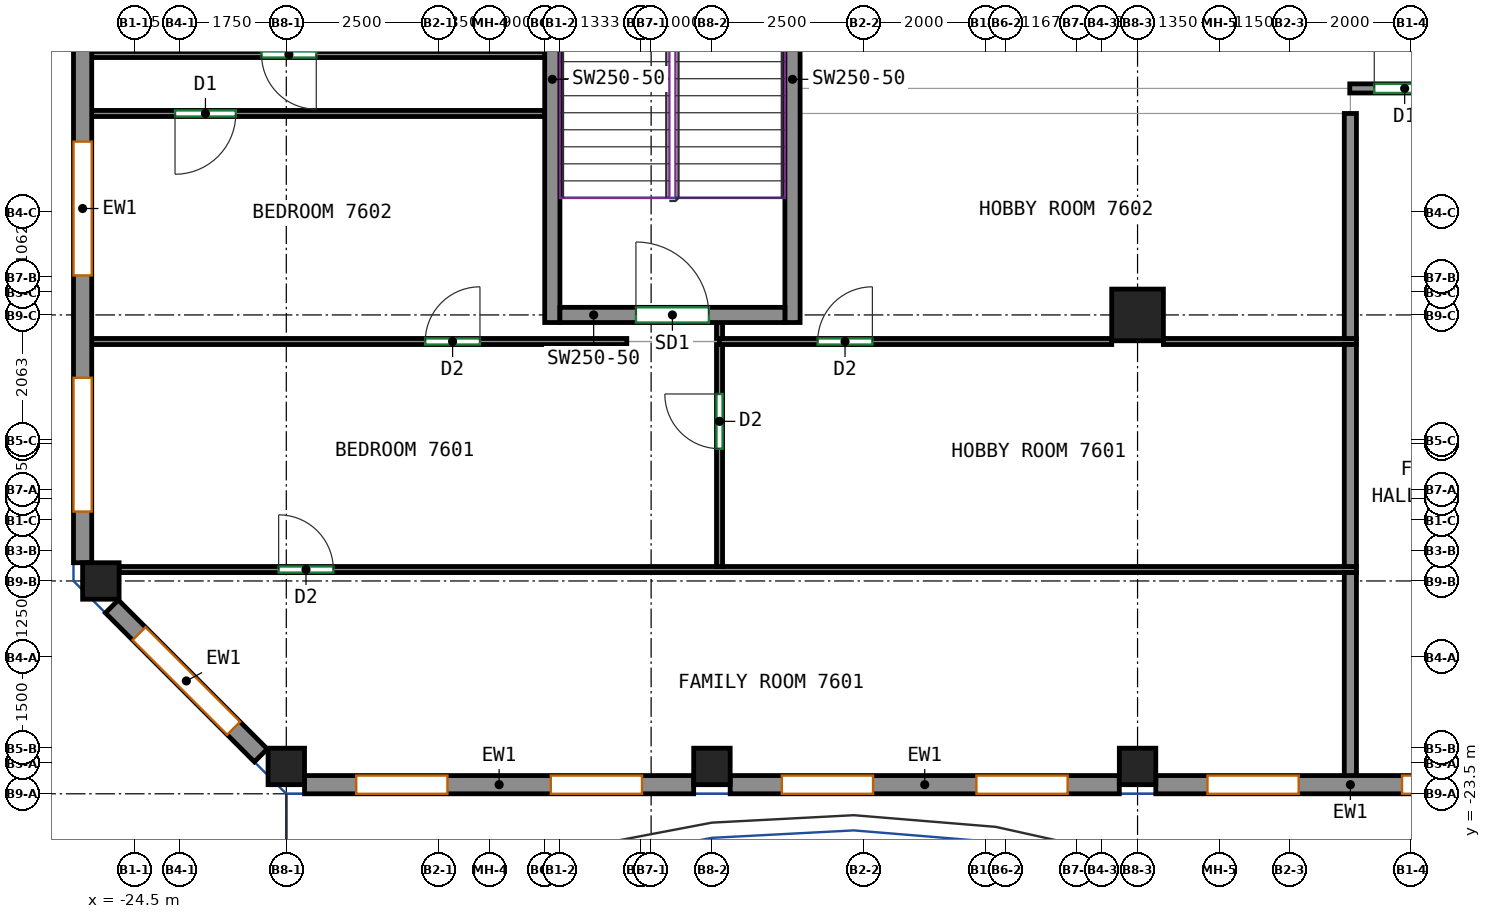
"""IFC4 building model, lengths in metres.
Left out: names, types, materials, properties, quantities, classifications, styles, units other than length and angle.
Written with IfcOpenShell. Run it as: python <this file> out.ifc"""

import sys

from ifc_helpers import new_model, si_unit, direction, frame, frame_2d, origin, origin_2d, place, context, subcontext, project, spatial, rectangle, extrude, source, transform, mapped, element, fill, save


model = new_model("IFC4")
c1 = context("Model", 3, precision=1e-05, world=origin(), true_north=direction((0.0, 1.0)))
c2 = subcontext(c1, "Body", "Model", "MODEL_VIEW")
j1 = project(units=[si_unit("LENGTHUNIT", "METRE"), si_unit("PLANEANGLEUNIT", "RADIAN")], contexts=[c1])
p1 = place(None, origin())
s1 = spatial("IfcSite", under=j1, at=p1, CompositionType="ELEMENT")
p2 = place(p1, origin())
s2 = spatial("IfcBuilding", under=s1, at=p2, CompositionType="ELEMENT")
p3 = place(p2, frame((0.0, 0.0, 305.2)))
s3 = spatial("IfcBuildingStorey", under=s2, at=p3, CompositionType="ELEMENT", Elevation=305.2)
m1 = source(origin(), c2, "Body", "SweptSolid", [
    extrude(rectangle(XDim=0.6, YDim=0.6, at=origin_2d()), origin(), (0.0, 0.0, 1.0), 3.12),
])
for number, where, z_axis, x_axis in (
    (1, (-25.05, -20.0, 0.0), (0.0, 0.0, 1.0), (1.0, 0.0, 0.0)),
    (2, (-22.0, -23.05, 0.0), (0.0, 0.0, 1.0), (1.0, 0.0, 0.0)),
    (3, (-15.0, -23.05, 0.0), (0.0, 0.0, 1.0), (1.0, 0.0, 0.0)),
    (4, (-8.0, -23.05, 0.0), (0.0, 0.0, 1.0), (1.0, 0.0, 0.0)),
):
    element("IfcColumn", number, at=place(p3, frame(where, z_axis=z_axis, x_axis=x_axis)), inside=s3, PredefinedType="COLUMN", context=c2, shape_type="MappedRepresentation", body=[
        mapped(m1, transform((0.0, 0.0, 0.0))),
    ])
m2 = source(origin(), c2, "Body", "SweptSolid", [
    extrude(rectangle(XDim=0.85, YDim=0.85, at=origin_2d()), origin(), (0.0, 0.0, 1.0), 3.12),
])
p4 = place(p3, frame((-8.0, -15.625, 0.0), z_axis=(0.0, 0.0, 1.0), x_axis=(1.0, 0.0, 0.0)))
e5 = element("IfcColumn", 5, at=p4, inside=s3, PredefinedType="COLUMN", context=c2, shape_type="MappedRepresentation", body=[
    mapped(m2, transform((0.0, 0.0, 0.0))),
])
m3 = source(origin(), c2, "Body", "SweptSolid", [
    extrude(rectangle(XDim=8.0, YDim=0.25, at=frame_2d((4.0, 0.0))), origin(), (0.0, 0.0, 1.0), 3.12),
])
for number, where, z_axis, x_axis in (
    (6, (-17.625, -15.75, 0.0), (0.0, 0.0, 1.0), (0.0, 1.0, 0.0)),
    (7, (-13.675, -15.75, 0.0), (0.0, 0.0, 1.0), (0.0, 1.0, 0.0)),
):
    element("IfcWall", number, at=place(p3, frame(where, z_axis=z_axis, x_axis=x_axis)), inside=s3, PredefinedType="SHEAR", context=c2, shape_type="MappedRepresentation", body=[
        mapped(m3, transform((0.0, 0.0, 0.0))),
    ])
m4 = source(origin(), c2, "Body", "SweptSolid", [
    extrude(rectangle(XDim=3.7, YDim=0.25, at=frame_2d((1.85, 0.0))), origin(), (0.0, 0.0, 1.0), 3.12),
])
p5 = place(p3, frame((-17.5, -15.625, 0.0), z_axis=(0.0, 0.0, 1.0), x_axis=(1.0, 0.0, 0.0)))
e8 = element("IfcWall", 8, at=p5, inside=s3, PredefinedType="SHEAR", context=c2, shape_type="MappedRepresentation", body=[
    mapped(m4, transform((0.0, 0.0, 0.0))),
])
p6 = place(p5, frame((1.25, 0.0, 0.0)))
e9 = element("IfcOpeningElement", 9, at=p6, cuts=e8, PredefinedType="OPENING", context=c2, shape_type="SweptSolid", body=[
    extrude(rectangle(XDim=1.2, YDim=2.1, at=frame_2d((0.6, 1.05))), frame((0.0, 0.135, 0.0), z_axis=(0.0, -1.0, 0.0), x_axis=(1.0, 0.0, 0.0)), (0.0, 0.0, 1.0), 0.27),
])
m5 = source(origin(), c2, "Body", "SweptSolid", [
    extrude(rectangle(XDim=6.4, YDim=0.3, at=frame_2d((3.2, 0.0))), origin(), (0.0, 0.0, 1.0), 3.12),
])
p7 = place(p3, frame((-21.7, -23.35, 0.0), z_axis=(0.0, 0.0, 1.0), x_axis=(1.0, 0.0, 0.0)))
e10 = element("IfcWall", 10, at=p7, inside=s3, PredefinedType="SOLIDWALL", context=c2, shape_type="MappedRepresentation", body=[
    mapped(m5, transform((0.0, 0.0, 0.0))),
])
p8 = place(p7, frame((0.85, 0.0, 0.8)))
e11 = element("IfcOpeningElement", 11, at=p8, cuts=e10, PredefinedType="OPENING", context=c2, shape_type="SweptSolid", body=[
    extrude(rectangle(XDim=1.5, YDim=2.05, at=frame_2d((0.75, 1.025))), frame((0.0, 0.16, 0.0), z_axis=(0.0, -1.0, 0.0), x_axis=(1.0, 0.0, 0.0)), (0.0, 0.0, 1.0), 0.32),
])
p9 = place(p7, frame((4.05, 0.0, 0.8)))
e12 = element("IfcOpeningElement", 12, at=p9, cuts=e10, PredefinedType="OPENING", context=c2, shape_type="SweptSolid", body=[
    extrude(rectangle(XDim=1.5, YDim=2.05, at=frame_2d((0.75, 1.025))), frame((0.0, 0.16, 0.0), z_axis=(0.0, -1.0, 0.0), x_axis=(1.0, 0.0, 0.0)), (0.0, 0.0, 1.0), 0.32),
])
p10 = place(p3, frame((-14.7, -23.35, 0.0), z_axis=(0.0, 0.0, 1.0), x_axis=(1.0, 0.0, 0.0)))
e13 = element("IfcWall", 13, at=p10, inside=s3, PredefinedType="SOLIDWALL", context=c2, shape_type="MappedRepresentation", body=[
    mapped(m5, transform((0.0, 0.0, 0.0))),
])
p11 = place(p10, frame((0.85, 0.0, 0.8)))
e14 = element("IfcOpeningElement", 14, at=p11, cuts=e13, PredefinedType="OPENING", context=c2, shape_type="SweptSolid", body=[
    extrude(rectangle(XDim=1.5, YDim=2.05, at=frame_2d((0.75, 1.025))), frame((0.0, 0.16, 0.0), z_axis=(0.0, -1.0, 0.0), x_axis=(1.0, 0.0, 0.0)), (0.0, 0.0, 1.0), 0.32),
])
p12 = place(p10, frame((4.05, 0.0, 0.8)))
e15 = element("IfcOpeningElement", 15, at=p12, cuts=e13, PredefinedType="OPENING", context=c2, shape_type="SweptSolid", body=[
    extrude(rectangle(XDim=1.5, YDim=2.05, at=frame_2d((0.75, 1.025))), frame((0.0, 0.16, 0.0), z_axis=(0.0, -1.0, 0.0), x_axis=(1.0, 0.0, 0.0)), (0.0, 0.0, 1.0), 0.32),
])
p13 = place(p3, frame((-7.7, -23.35, 0.0), z_axis=(0.0, 0.0, 1.0), x_axis=(1.0, 0.0, 0.0)))
e16 = element("IfcWall", 16, at=p13, inside=s3, PredefinedType="SOLIDWALL", context=c2, shape_type="MappedRepresentation", body=[
    mapped(m5, transform((0.0, 0.0, 0.0))),
])
p14 = place(p13, frame((0.85, 0.0, 0.8)))
e17 = element("IfcOpeningElement", 17, at=p14, cuts=e16, PredefinedType="OPENING", context=c2, shape_type="SweptSolid", body=[
    extrude(rectangle(XDim=1.5, YDim=2.05, at=frame_2d((0.75, 1.025))), frame((0.0, 0.16, 0.0), z_axis=(0.0, -1.0, 0.0), x_axis=(1.0, 0.0, 0.0)), (0.0, 0.0, 1.0), 0.32),
])
p15 = place(p13, frame((4.05, 0.0, 0.8)))
e18 = element("IfcOpeningElement", 18, at=p15, cuts=e16, PredefinedType="OPENING", context=c2, shape_type="SweptSolid", body=[
    extrude(rectangle(XDim=1.5, YDim=2.05, at=frame_2d((0.75, 1.025))), frame((0.0, 0.16, 0.0), z_axis=(0.0, -1.0, 0.0), x_axis=(1.0, 0.0, 0.0)), (0.0, 0.0, 1.0), 0.32),
])
m6 = source(origin(), c2, "Body", "SweptSolid", [
    extrude(rectangle(XDim=11.65, YDim=0.3, at=frame_2d((5.825, 0.0))), origin(), (0.0, 0.0, 1.0), 3.12),
])
p16 = place(p3, frame((-25.35, -8.05, 0.0), z_axis=(0.0, 0.0, 1.0), x_axis=(0.0, -1.0, 0.0)))
e19 = element("IfcWall", 19, at=p16, inside=s3, PredefinedType="SOLIDWALL", context=c2, shape_type="MappedRepresentation", body=[
    mapped(m6, transform((0.0, 0.0, 0.0))),
])
p17 = place(p16, frame((0.842, 0.0, 0.8)))
e20 = element("IfcOpeningElement", 20, at=p17, cuts=e19, PredefinedType="OPENING", context=c2, shape_type="SweptSolid", body=[
    extrude(rectangle(XDim=2.2, YDim=2.05, at=frame_2d((1.1, 1.025))), frame((0.0, 0.16, 0.0), z_axis=(0.0, -1.0, 0.0), x_axis=(1.0, 0.0, 0.0)), (0.0, 0.0, 1.0), 0.32),
])
p18 = place(p16, frame((4.725, 0.0, 0.8)))
e21 = element("IfcOpeningElement", 21, at=p18, cuts=e19, PredefinedType="OPENING", context=c2, shape_type="SweptSolid", body=[
    extrude(rectangle(XDim=2.2, YDim=2.05, at=frame_2d((1.1, 1.025))), frame((0.0, 0.16, 0.0), z_axis=(0.0, -1.0, 0.0), x_axis=(1.0, 0.0, 0.0)), (0.0, 0.0, 1.0), 0.32),
])
p19 = place(p16, frame((8.608, 0.0, 0.8)))
e22 = element("IfcOpeningElement", 22, at=p19, cuts=e19, PredefinedType="OPENING", context=c2, shape_type="SweptSolid", body=[
    extrude(rectangle(XDim=2.2, YDim=2.05, at=frame_2d((1.1, 1.025))), frame((0.0, 0.16, 0.0), z_axis=(0.0, -1.0, 0.0), x_axis=(1.0, 0.0, 0.0)), (0.0, 0.0, 1.0), 0.32),
])
m7 = source(origin(), c2, "Body", "SweptSolid", [
    extrude(rectangle(XDim=3.465, YDim=0.3, at=frame_2d((1.732, 0.0))), origin(), (0.0, 0.0, 1.0), 3.12),
])
p20 = place(p3, frame((-24.869, -20.419, 0.0), z_axis=(0.0, 0.0, 1.0), x_axis=(0.707106781187, -0.707106781187, 0.0)))
e23 = element("IfcWall", 23, at=p20, inside=s3, PredefinedType="SOLIDWALL", context=c2, shape_type="MappedRepresentation", body=[
    mapped(m7, transform((0.0, 0.0, 0.0))),
])
p21 = place(p20, frame((0.632, 0.0, 0.8)))
e24 = element("IfcOpeningElement", 24, at=p21, cuts=e23, PredefinedType="OPENING", context=c2, shape_type="SweptSolid", body=[
    extrude(rectangle(XDim=2.2, YDim=2.05, at=frame_2d((1.1, 1.025))), frame((0.0, 0.16, 0.0), z_axis=(0.0, -1.0, 0.0), x_axis=(1.0, 0.0, 0.0)), (0.0, 0.0, 1.0), 0.32),
])
p22 = place(p3, frame((-4.51, -11.9, 0.0), z_axis=(0.0, 0.0, 1.0), x_axis=(1.0, 0.0, 0.0)))
e25 = element("IfcWall", 25, at=p22, inside=s3, PredefinedType="PARTITIONING", context=c2, shape_type="SweptSolid", body=[
    extrude(rectangle(XDim=22.26, YDim=0.15, at=frame_2d((11.13, 0.0))), origin(), (0.0, 0.0, 1.0), 3.12),
])
p23 = place(p22, frame((0.403, 0.0, 0.0)))
e26 = element("IfcOpeningElement", 26, at=p23, cuts=e25, PredefinedType="OPENING", context=c2, shape_type="SweptSolid", body=[
    extrude(rectangle(XDim=1.0, YDim=2.1, at=frame_2d((0.5, 1.05))), frame((0.0, 0.085, 0.0), z_axis=(0.0, -1.0, 0.0), x_axis=(1.0, 0.0, 0.0)), (0.0, 0.0, 1.0), 0.17),
])
p24 = place(p3, frame((-24.75, -19.812, 0.0), z_axis=(0.0, 0.0, 1.0), x_axis=(1.0, 0.0, 0.0)))
e27 = element("IfcWall", 27, at=p24, inside=s3, PredefinedType="PARTITIONING", context=c2, shape_type="SweptSolid", body=[
    extrude(rectangle(XDim=20.35, YDim=0.1, at=frame_2d((10.175, 0.0))), origin(), (0.0, 0.0, 1.0), 3.12),
])
p25 = place(p24, frame((2.624, 0.0, 0.0)))
e28 = element("IfcOpeningElement", 28, at=p25, cuts=e27, PredefinedType="OPENING", context=c2, shape_type="SweptSolid", body=[
    extrude(rectangle(XDim=0.9, YDim=2.1, at=frame_2d((0.45, 1.05))), frame((0.0, 0.06, 0.0), z_axis=(0.0, -1.0, 0.0), x_axis=(1.0, 0.0, 0.0)), (0.0, 0.0, 1.0), 0.12),
])
p26 = place(p3, frame((-4.5, -23.25, 0.0), z_axis=(0.0, 0.0, 1.0), x_axis=(0.0, 1.0, 0.0)))
e29 = element("IfcWall", 29, at=p26, inside=s3, PredefinedType="PARTITIONING", context=c2, shape_type="SweptSolid", body=[
    extrude(rectangle(XDim=3.388, YDim=0.2, at=frame_2d((1.694, 0.0))), origin(), (0.0, 0.0, 1.0), 3.12),
])
p27 = place(p3, frame((-14.875, -19.762, 0.0), z_axis=(0.0, 0.0, 1.0), x_axis=(0.0, 1.0, 0.0)))
e30 = element("IfcWall", 30, at=p27, inside=s3, PredefinedType="PARTITIONING", context=c2, shape_type="SweptSolid", body=[
    extrude(rectangle(XDim=3.65, YDim=0.1, at=frame_2d((1.825, 0.0))), origin(), (0.0, 0.0, 1.0), 3.12),
])
p28 = place(p27, frame((1.937, 0.0, 0.0)))
e31 = element("IfcOpeningElement", 31, at=p28, cuts=e30, PredefinedType="OPENING", context=c2, shape_type="SweptSolid", body=[
    extrude(rectangle(XDim=0.9, YDim=2.1, at=frame_2d((0.45, 1.05))), frame((0.0, 0.06, 0.0), z_axis=(0.0, -1.0, 0.0), x_axis=(1.0, 0.0, 0.0)), (0.0, 0.0, 1.0), 0.12),
])
p29 = place(p3, frame((-25.25, -16.062, 0.0), z_axis=(0.0, 0.0, 1.0), x_axis=(1.0, 0.0, 0.0)))
e32 = element("IfcWall", 32, at=p29, inside=s3, PredefinedType="PARTITIONING", context=c2, shape_type="SweptSolid", body=[
    extrude(rectangle(XDim=8.85, YDim=0.1, at=frame_2d((4.425, 0.0))), origin(), (0.0, 0.0, 1.0), 3.12),
])
p30 = place(p29, frame((5.535, 0.0, 0.0)))
e33 = element("IfcOpeningElement", 33, at=p30, cuts=e32, PredefinedType="OPENING", context=c2, shape_type="SweptSolid", body=[
    extrude(rectangle(XDim=0.9, YDim=2.1, at=frame_2d((0.45, 1.05))), frame((0.0, 0.06, 0.0), z_axis=(0.0, -1.0, 0.0), x_axis=(1.0, 0.0, 0.0)), (0.0, 0.0, 1.0), 0.12),
])
p31 = place(p3, frame((-7.575, -16.062, 0.0), z_axis=(0.0, 0.0, 1.0), x_axis=(1.0, 0.0, 0.0)))
e34 = element("IfcWall", 34, at=p31, inside=s3, PredefinedType="PARTITIONING", context=c2, shape_type="SweptSolid", body=[
    extrude(rectangle(XDim=3.175, YDim=0.1, at=frame_2d((1.587, 0.0))), origin(), (0.0, 0.0, 1.0), 3.12),
])
p32 = place(p3, frame((-14.875, -16.062, 0.0), z_axis=(0.0, 0.0, 1.0), x_axis=(1.0, 0.0, 0.0)))
e35 = element("IfcWall", 35, at=p32, inside=s3, PredefinedType="PARTITIONING", context=c2, shape_type="SweptSolid", body=[
    extrude(rectangle(XDim=6.45, YDim=0.1, at=frame_2d((3.225, 0.0))), origin(), (0.0, 0.0, 1.0), 3.12),
])
p33 = place(p32, frame((1.614, 0.0, 0.0)))
e36 = element("IfcOpeningElement", 36, at=p33, cuts=e35, PredefinedType="OPENING", context=c2, shape_type="SweptSolid", body=[
    extrude(rectangle(XDim=0.9, YDim=2.1, at=frame_2d((0.45, 1.05))), frame((0.0, 0.06, 0.0), z_axis=(0.0, -1.0, 0.0), x_axis=(1.0, 0.0, 0.0)), (0.0, 0.0, 1.0), 0.12),
])
p34 = place(p3, frame((-4.5, -19.762, 0.0), z_axis=(0.0, 0.0, 1.0), x_axis=(0.0, 1.0, 0.0)))
e37 = element("IfcWall", 37, at=p34, inside=s3, PredefinedType="PARTITIONING", context=c2, shape_type="SweptSolid", body=[
    extrude(rectangle(XDim=3.65, YDim=0.2, at=frame_2d((1.825, 0.0))), origin(), (0.0, 0.0, 1.0), 3.12),
])
p35 = place(p3, frame((-14.875, -16.012, 0.0), z_axis=(0.0, 0.0, 1.0), x_axis=(0.0, 1.0, 0.0)))
e38 = element("IfcWall", 38, at=p35, inside=s3, PredefinedType="PARTITIONING", context=c2, shape_type="SweptSolid", body=[
    extrude(rectangle(XDim=0.312, YDim=0.1, at=frame_2d((0.156, 0.0))), origin(), (0.0, 0.0, 1.0), 3.12),
])
p36 = place(p3, frame((-17.75, -12.312, 0.0), z_axis=(0.0, 0.0, 1.0), x_axis=(-1.0, 0.0, 0.0)))
e39 = element("IfcWall", 39, at=p36, inside=s3, PredefinedType="PARTITIONING", context=c2, shape_type="SweptSolid", body=[
    extrude(rectangle(XDim=7.5, YDim=0.1, at=frame_2d((3.75, 0.0))), origin(), (0.0, 0.0, 1.0), 3.12),
])
p37 = place(p36, frame((5.08, 0.0, 0.0)))
e40 = element("IfcOpeningElement", 40, at=p37, cuts=e39, PredefinedType="OPENING", context=c2, shape_type="SweptSolid", body=[
    extrude(rectangle(XDim=1.0, YDim=2.1, at=frame_2d((0.5, 1.05))), frame((0.0, 0.06, 0.0), z_axis=(0.0, -1.0, 0.0), x_axis=(1.0, 0.0, 0.0)), (0.0, 0.0, 1.0), 0.12),
])
p38 = place(p3, frame((-4.5, -16.012, 0.0), z_axis=(0.0, 0.0, 1.0), x_axis=(0.0, 1.0, 0.0)))
e41 = element("IfcWall", 41, at=p38, inside=s3, PredefinedType="PARTITIONING", context=c2, shape_type="SweptSolid", body=[
    extrude(rectangle(XDim=3.7, YDim=0.2, at=frame_2d((1.85, 0.0))), origin(), (0.0, 0.0, 1.0), 3.12),
])
p39 = place(p3, frame((-17.75, -11.342, 0.0), z_axis=(0.0, 0.0, 1.0), x_axis=(-1.0, 0.0, 0.0)))
e42 = element("IfcWall", 42, at=p39, inside=s3, PredefinedType="PARTITIONING", context=c2, shape_type="SweptSolid", body=[
    extrude(rectangle(XDim=7.5, YDim=0.1, at=frame_2d((3.75, 0.0))), origin(), (0.0, 0.0, 1.0), 3.12),
])
p40 = place(p39, frame((3.757, 0.0, 0.0)))
e43 = element("IfcOpeningElement", 43, at=p40, cuts=e42, PredefinedType="OPENING", context=c2, shape_type="SweptSolid", body=[
    extrude(rectangle(XDim=0.9, YDim=2.1, at=frame_2d((0.45, 1.05))), frame((0.0, 0.06, 0.0), z_axis=(0.0, -1.0, 0.0), x_axis=(1.0, 0.0, 0.0)), (0.0, 0.0, 1.0), 0.12),
])
p41 = place(p8, origin())
e44 = element("IfcWindow", 44, at=p41, inside=s3, PartitioningType="SINGLE_PANEL", PredefinedType="WINDOW", context=c2, shape_type="SweptSolid", body=[
    extrude(rectangle(XDim=1.5, YDim=2.05, at=frame_2d((0.75, 1.025))), frame((0.0, 0.03, 0.0), z_axis=(0.0, -1.0, 0.0), x_axis=(1.0, 0.0, 0.0)), (0.0, 0.0, 1.0), 0.06),
])
fill(e11, e44)
p42 = place(p9, origin())
e45 = element("IfcWindow", 45, at=p42, inside=s3, PartitioningType="SINGLE_PANEL", PredefinedType="WINDOW", context=c2, shape_type="SweptSolid", body=[
    extrude(rectangle(XDim=1.5, YDim=2.05, at=frame_2d((0.75, 1.025))), frame((0.0, 0.03, 0.0), z_axis=(0.0, -1.0, 0.0), x_axis=(1.0, 0.0, 0.0)), (0.0, 0.0, 1.0), 0.06),
])
fill(e12, e45)
p43 = place(p11, origin())
e46 = element("IfcWindow", 46, at=p43, inside=s3, PartitioningType="SINGLE_PANEL", PredefinedType="WINDOW", context=c2, shape_type="SweptSolid", body=[
    extrude(rectangle(XDim=1.5, YDim=2.05, at=frame_2d((0.75, 1.025))), frame((0.0, 0.03, 0.0), z_axis=(0.0, -1.0, 0.0), x_axis=(1.0, 0.0, 0.0)), (0.0, 0.0, 1.0), 0.06),
])
fill(e14, e46)
p44 = place(p12, origin())
e47 = element("IfcWindow", 47, at=p44, inside=s3, PartitioningType="SINGLE_PANEL", PredefinedType="WINDOW", context=c2, shape_type="SweptSolid", body=[
    extrude(rectangle(XDim=1.5, YDim=2.05, at=frame_2d((0.75, 1.025))), frame((0.0, 0.03, 0.0), z_axis=(0.0, -1.0, 0.0), x_axis=(1.0, 0.0, 0.0)), (0.0, 0.0, 1.0), 0.06),
])
fill(e15, e47)
p45 = place(p14, origin())
e48 = element("IfcWindow", 48, at=p45, inside=s3, PartitioningType="SINGLE_PANEL", PredefinedType="WINDOW", context=c2, shape_type="SweptSolid", body=[
    extrude(rectangle(XDim=1.5, YDim=2.05, at=frame_2d((0.75, 1.025))), frame((0.0, 0.03, 0.0), z_axis=(0.0, -1.0, 0.0), x_axis=(1.0, 0.0, 0.0)), (0.0, 0.0, 1.0), 0.06),
])
fill(e17, e48)
p46 = place(p15, origin())
e49 = element("IfcWindow", 49, at=p46, inside=s3, PartitioningType="SINGLE_PANEL", PredefinedType="WINDOW", context=c2, shape_type="SweptSolid", body=[
    extrude(rectangle(XDim=1.5, YDim=2.05, at=frame_2d((0.75, 1.025))), frame((0.0, 0.03, 0.0), z_axis=(0.0, -1.0, 0.0), x_axis=(1.0, 0.0, 0.0)), (0.0, 0.0, 1.0), 0.06),
])
fill(e18, e49)
p47 = place(p18, origin())
e50 = element("IfcWindow", 50, at=p47, inside=s3, PartitioningType="SINGLE_PANEL", PredefinedType="WINDOW", context=c2, shape_type="SweptSolid", body=[
    extrude(rectangle(XDim=2.2, YDim=2.05, at=frame_2d((1.1, 1.025))), frame((0.0, 0.03, 0.0), z_axis=(0.0, -1.0, 0.0), x_axis=(1.0, 0.0, 0.0)), (0.0, 0.0, 1.0), 0.06),
])
fill(e21, e50)
p48 = place(p19, origin())
e51 = element("IfcWindow", 51, at=p48, inside=s3, PartitioningType="SINGLE_PANEL", PredefinedType="WINDOW", context=c2, shape_type="SweptSolid", body=[
    extrude(rectangle(XDim=2.2, YDim=2.05, at=frame_2d((1.1, 1.025))), frame((0.0, 0.03, 0.0), z_axis=(0.0, -1.0, 0.0), x_axis=(1.0, 0.0, 0.0)), (0.0, 0.0, 1.0), 0.06),
])
fill(e22, e51)
p49 = place(p21, origin())
e52 = element("IfcWindow", 52, at=p49, inside=s3, PartitioningType="SINGLE_PANEL", PredefinedType="WINDOW", context=c2, shape_type="SweptSolid", body=[
    extrude(rectangle(XDim=2.2, YDim=2.05, at=frame_2d((1.1, 1.025))), frame((0.0, 0.03, 0.0), z_axis=(0.0, -1.0, 0.0), x_axis=(1.0, 0.0, 0.0)), (0.0, 0.0, 1.0), 0.06),
])
fill(e24, e52)
p50 = place(p6, origin())
e53 = element("IfcDoor", 53, at=p50, inside=s3, OperationType="DOUBLE_DOOR_SINGLE_SWING", PredefinedType="DOOR", context=c2, shape_type="SweptSolid", body=[
    extrude(rectangle(XDim=1.2, YDim=2.1, at=frame_2d((0.6, 1.05))), frame((0.0, 0.025, 0.0), z_axis=(0.0, -1.0, 0.0), x_axis=(1.0, 0.0, 0.0)), (0.0, 0.0, 1.0), 0.05),
])
fill(e9, e53)
p51 = place(p25, origin())
e54 = element("IfcDoor", 54, at=p51, inside=s3, OperationType="SINGLE_SWING_LEFT", PredefinedType="DOOR", context=c2, shape_type="SweptSolid", body=[
    extrude(rectangle(XDim=0.9, YDim=2.1, at=frame_2d((0.45, 1.05))), frame((0.0, 0.025, 0.0), z_axis=(0.0, -1.0, 0.0), x_axis=(1.0, 0.0, 0.0)), (0.0, 0.0, 1.0), 0.05),
])
fill(e28, e54)
p52 = place(p28, origin())
e55 = element("IfcDoor", 55, at=p52, inside=s3, OperationType="SINGLE_SWING_RIGHT", PredefinedType="DOOR", context=c2, shape_type="SweptSolid", body=[
    extrude(rectangle(XDim=0.9, YDim=2.1, at=frame_2d((0.45, 1.05))), frame((0.0, 0.025, 0.0), z_axis=(0.0, -1.0, 0.0), x_axis=(1.0, 0.0, 0.0)), (0.0, 0.0, 1.0), 0.05),
])
fill(e31, e55)
p53 = place(p30, origin())
e56 = element("IfcDoor", 56, at=p53, inside=s3, OperationType="SINGLE_SWING_RIGHT", PredefinedType="DOOR", context=c2, shape_type="SweptSolid", body=[
    extrude(rectangle(XDim=0.9, YDim=2.1, at=frame_2d((0.45, 1.05))), frame((0.0, 0.025, 0.0), z_axis=(0.0, -1.0, 0.0), x_axis=(1.0, 0.0, 0.0)), (0.0, 0.0, 1.0), 0.05),
])
fill(e33, e56)
p54 = place(p33, origin())
e57 = element("IfcDoor", 57, at=p54, inside=s3, OperationType="SINGLE_SWING_RIGHT", PredefinedType="DOOR", context=c2, shape_type="SweptSolid", body=[
    extrude(rectangle(XDim=0.9, YDim=2.1, at=frame_2d((0.45, 1.05))), frame((0.0, 0.025, 0.0), z_axis=(0.0, -1.0, 0.0), x_axis=(1.0, 0.0, 0.0)), (0.0, 0.0, 1.0), 0.05),
])
fill(e36, e57)
p55 = place(p37, origin())
e58 = element("IfcDoor", 58, at=p55, inside=s3, OperationType="SINGLE_SWING_RIGHT", PredefinedType="DOOR", context=c2, shape_type="SweptSolid", body=[
    extrude(rectangle(XDim=1.0, YDim=2.1, at=frame_2d((0.5, 1.05))), frame((0.0, 0.025, 0.0), z_axis=(0.0, -1.0, 0.0), x_axis=(1.0, 0.0, 0.0)), (0.0, 0.0, 1.0), 0.05),
])
fill(e40, e58)
p56 = place(p23, origin())
e59 = element("IfcDoor", 59, at=p56, inside=s3, OperationType="SINGLE_SWING_LEFT", PredefinedType="DOOR", context=c2, shape_type="SweptSolid", body=[
    extrude(rectangle(XDim=1.0, YDim=2.1, at=frame_2d((0.5, 1.05))), frame((0.0, 0.025, 0.0), z_axis=(0.0, -1.0, 0.0), x_axis=(1.0, 0.0, 0.0)), (0.0, 0.0, 1.0), 0.05),
])
fill(e26, e59)
p57 = place(p40, origin())
e60 = element("IfcDoor", 60, at=p57, inside=s3, OperationType="SINGLE_SWING_LEFT", PredefinedType="DOOR", context=c2, shape_type="SweptSolid", body=[
    extrude(rectangle(XDim=0.9, YDim=2.1, at=frame_2d((0.45, 1.05))), frame((0.0, 0.025, 0.0), z_axis=(0.0, -1.0, 0.0), x_axis=(1.0, 0.0, 0.0)), (0.0, 0.0, 1.0), 0.05),
])
fill(e43, e60)
save(model, sys.argv[1])
